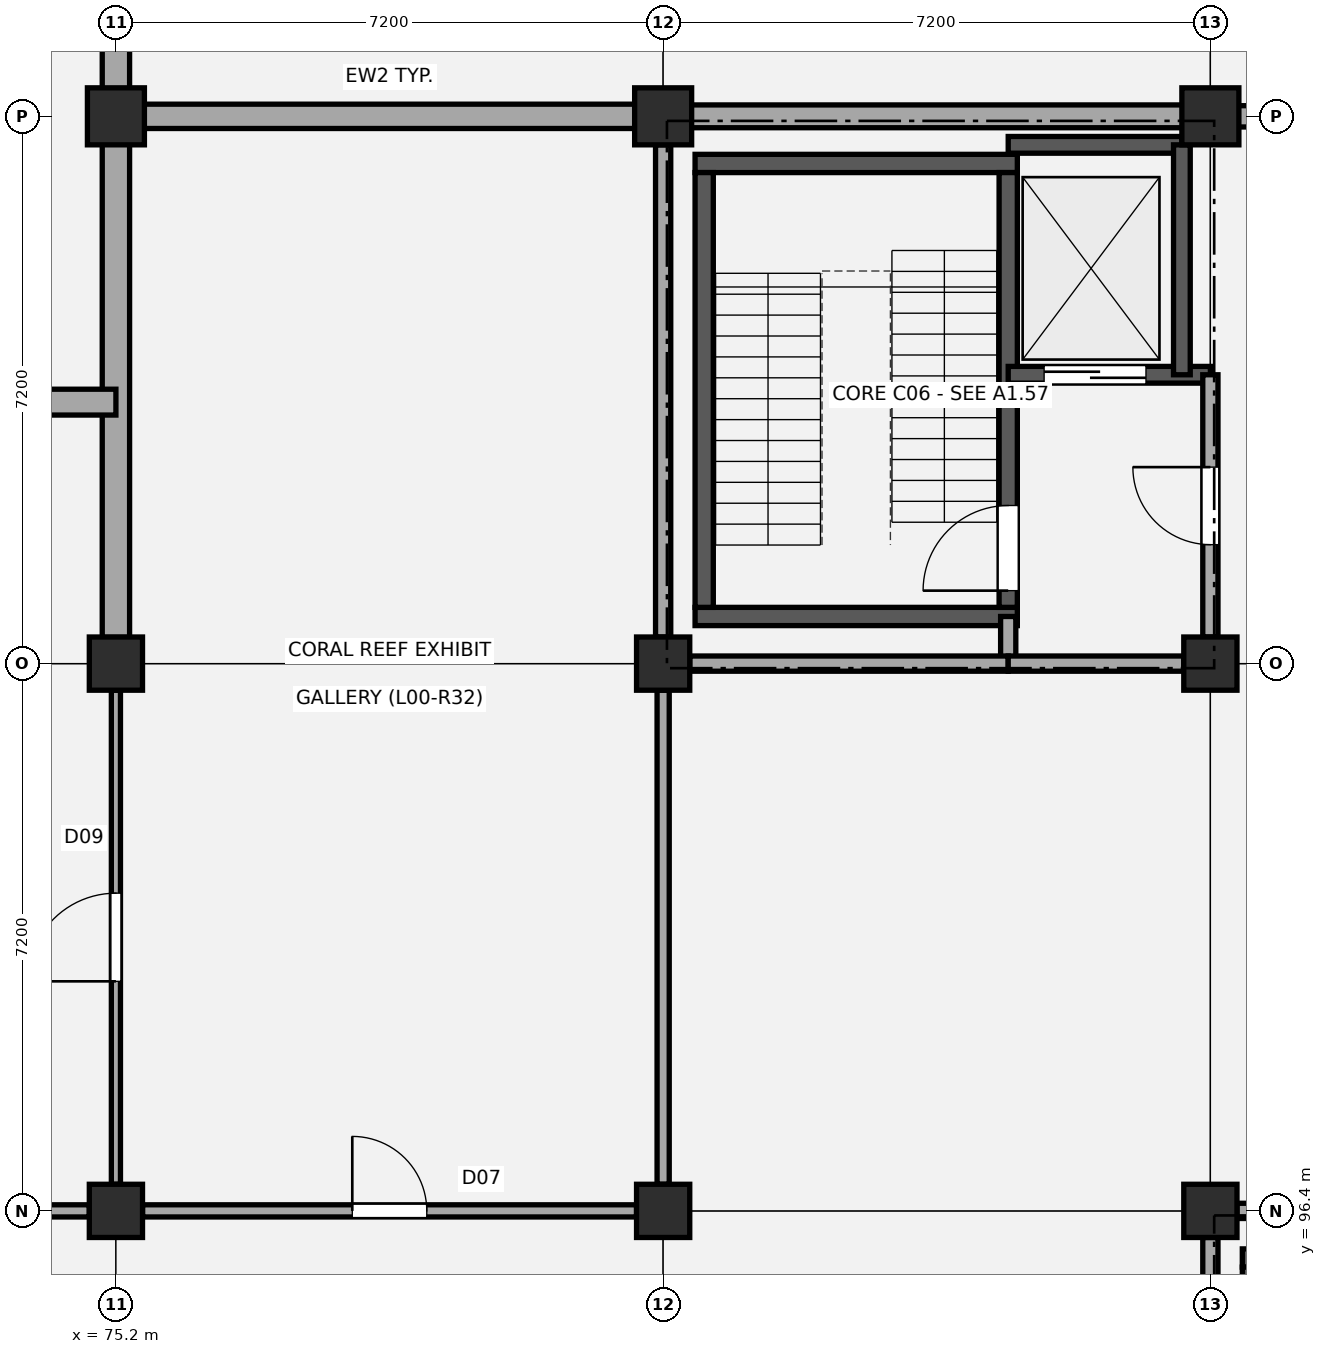
"""IFC4 building model, lengths in metres.
Left out: names, types, materials, properties, quantities, classifications, styles, units other than length and angle.
Written with IfcOpenShell. Run it as: python <this file> out.ifc"""

import sys

from ifc_helpers import new_model, si_unit, direction, frame, frame_2d, origin, origin_2d, place, context, subcontext, project, spatial, rectangle, circle, extrude, element, fill, save


model = new_model("IFC4")
c1 = context("Model", 3, precision=1e-05, world=origin(), true_north=direction((0.0, 1.0)))
c2 = subcontext(c1, "Body", "Model", "MODEL_VIEW")
j1 = project(units=[si_unit("LENGTHUNIT", "METRE"), si_unit("PLANEANGLEUNIT", "RADIAN")], contexts=[c1])
p1 = place(None, origin())
s1 = spatial("IfcSite", under=j1, at=p1, CompositionType="ELEMENT")
p2 = place(p1, origin())
s2 = spatial("IfcBuilding", under=s1, at=p2, CompositionType="ELEMENT")
p3 = place(p2, origin())
s3 = spatial("IfcBuildingStorey", under=s2, at=p3, CompositionType="ELEMENT", Elevation=0.0)
for number, where, z_axis, x_axis in (
    (1, (75.2, 96.4, -0.35), (0.0, 0.0, 1.0), (1.0, 0.0, 0.0)),
    (2, (75.2, 103.6, -0.35), (0.0, 0.0, 1.0), (1.0, 0.0, 0.0)),
):
    element("IfcColumn", number, at=place(p3, frame(where, z_axis=z_axis, x_axis=x_axis)), inside=s3, PredefinedType="COLUMN", context=c2, shape_type="SweptSolid", body=[
        extrude(rectangle(XDim=0.7, YDim=0.7, at=origin_2d()), origin(), (0.0, 0.0, 1.0), 5.03),
    ])
p4 = place(p3, frame((75.2, 110.8, -0.35), z_axis=(0.0, 0.0, 1.0), x_axis=(1.0, 0.0, 0.0)))
e3 = element("IfcColumn", 3, at=p4, inside=s3, PredefinedType="COLUMN", context=c2, shape_type="SweptSolid", body=[
    extrude(circle(Radius=0.375, at=origin_2d()), origin(), (0.0, 0.0, 1.0), 5.03),
])
for number, where, z_axis, x_axis in (
    (4, (82.4, 96.4, -0.35), (0.0, 0.0, 1.0), (1.0, 0.0, 0.0)),
    (5, (82.4, 103.6, -0.35), (0.0, 0.0, 1.0), (1.0, 0.0, 0.0)),
):
    element("IfcColumn", number, at=place(p3, frame(where, z_axis=z_axis, x_axis=x_axis)), inside=s3, PredefinedType="COLUMN", context=c2, shape_type="SweptSolid", body=[
        extrude(rectangle(XDim=0.7, YDim=0.7, at=origin_2d()), origin(), (0.0, 0.0, 1.0), 5.03),
    ])
p5 = place(p3, frame((82.4, 110.8, -0.35), z_axis=(0.0, 0.0, 1.0), x_axis=(1.0, 0.0, 0.0)))
e6 = element("IfcColumn", 6, at=p5, inside=s3, PredefinedType="COLUMN", context=c2, shape_type="SweptSolid", body=[
    extrude(circle(Radius=0.375, at=origin_2d()), origin(), (0.0, 0.0, 1.0), 5.03),
])
for number, where, z_axis, x_axis in (
    (7, (89.6, 96.4, -0.35), (0.0, 0.0, 1.0), (1.0, 0.0, 0.0)),
    (8, (89.6, 103.6, -0.35), (0.0, 0.0, 1.0), (1.0, 0.0, 0.0)),
):
    element("IfcColumn", number, at=place(p3, frame(where, z_axis=z_axis, x_axis=x_axis)), inside=s3, PredefinedType="COLUMN", context=c2, shape_type="SweptSolid", body=[
        extrude(rectangle(XDim=0.7, YDim=0.7, at=origin_2d()), origin(), (0.0, 0.0, 1.0), 5.03),
    ])
p6 = place(p3, frame((89.6, 110.8, -0.35), z_axis=(0.0, 0.0, 1.0), x_axis=(1.0, 0.0, 0.0)))
e9 = element("IfcColumn", 9, at=p6, inside=s3, PredefinedType="COLUMN", context=c2, shape_type="SweptSolid", body=[
    extrude(circle(Radius=0.375, at=origin_2d()), origin(), (0.0, 0.0, 1.0), 5.03),
])
p7 = place(p3, frame((75.51, 110.8, 0.0), z_axis=(0.0, 0.0, 1.0), x_axis=(1.0, 0.0, 0.0)))
e10 = element("IfcWall", 10, at=p7, inside=s3, PredefinedType="STANDARD", context=c2, shape_type="SweptSolid", body=[
    extrude(rectangle(XDim=6.58, YDim=0.32, at=frame_2d((3.29, 0.0))), origin(), (0.0, 0.0, 1.0), 3.67),
])
p8 = place(p3, frame((82.71, 110.8, 0.0), z_axis=(0.0, 0.0, 1.0), x_axis=(1.0, 0.0, 0.0)))
e11 = element("IfcWall", 11, at=p8, inside=s3, PredefinedType="STANDARD", context=c2, shape_type="SweptSolid", body=[
    extrude(rectangle(XDim=6.58, YDim=0.3, at=frame_2d((3.29, 0.0))), origin(), (0.0, 0.0, 1.0), 3.67),
])
p9 = place(p3, frame((89.91, 110.8, 0.0), z_axis=(0.0, 0.0, 1.0), x_axis=(1.0, 0.0, 0.0)))
e12 = element("IfcWall", 12, at=p9, inside=s3, PredefinedType="STANDARD", context=c2, shape_type="SweptSolid", body=[
    extrude(rectangle(XDim=6.58, YDim=0.28, at=frame_2d((3.29, 0.0))), origin(), (0.0, 0.0, 1.0), 3.67),
])
p10 = place(p9, frame((2.18, 0.0, 0.0)))
e13 = element("IfcOpeningElement", 13, at=p10, cuts=e12, PredefinedType="OPENING", context=c2, shape_type="SweptSolid", body=[
    extrude(rectangle(XDim=2.22, YDim=2.38, at=frame_2d((1.11, 1.19))), frame((0.0, 0.15, 0.0), z_axis=(0.0, -1.0, 0.0), x_axis=(1.0, 0.0, 0.0)), (0.0, 0.0, 1.0), 0.3),
])
p11 = place(p3, frame((75.2, 103.945, 0.0), z_axis=(0.0, 0.0, 1.0), x_axis=(0.0, 1.0, 0.0)))
e14 = element("IfcWall", 14, at=p11, inside=s3, PredefinedType="STANDARD", context=c2, shape_type="SweptSolid", body=[
    extrude(rectangle(XDim=8.095, YDim=0.36, at=frame_2d((4.047, 0.0))), origin(), (0.0, 0.0, 1.0), 3.62),
])
p12 = place(p3, frame((73.8, 107.04, 0.0), z_axis=(0.0, 0.0, 1.0), x_axis=(1.0, 0.0, 0.0)))
e15 = element("IfcWall", 15, at=p12, inside=s3, PredefinedType="STANDARD", context=c2, shape_type="SweptSolid", body=[
    extrude(rectangle(XDim=1.4, YDim=0.34, at=frame_2d((0.7, 0.0))), origin(), (0.0, 0.0, 1.0), 8.87),
])
for number, where, z_axis, x_axis in (
    (16, (82.82, 104.22, 0.0), (0.0, 0.0, 1.0), (1.0, 0.0, 0.0)),
    (17, (82.82, 110.18, 0.0), (0.0, 0.0, 1.0), (1.0, 0.0, 0.0)),
):
    element("IfcWall", number, at=place(p3, frame(where, z_axis=z_axis, x_axis=x_axis)), inside=s3, PredefinedType="SHEAR", context=c2, shape_type="SweptSolid", body=[
        extrude(rectangle(XDim=4.24, YDim=0.24, at=frame_2d((2.12, 0.0))), origin(), (0.0, 0.0, 1.0), 4.38),
    ])
p13 = place(p3, frame((82.94, 104.34, 0.0), z_axis=(0.0, 0.0, 1.0), x_axis=(0.0, 1.0, 0.0)))
e18 = element("IfcWall", 18, at=p13, inside=s3, PredefinedType="SHEAR", context=c2, shape_type="SweptSolid", body=[
    extrude(rectangle(XDim=5.72, YDim=0.24, at=frame_2d((2.86, 0.0))), origin(), (0.0, 0.0, 1.0), 4.38),
])
p14 = place(p3, frame((86.94, 104.34, 0.0), z_axis=(0.0, 0.0, 1.0), x_axis=(0.0, 1.0, 0.0)))
e19 = element("IfcWall", 19, at=p14, inside=s3, PredefinedType="SHEAR", context=c2, shape_type="SweptSolid", body=[
    extrude(rectangle(XDim=5.72, YDim=0.24, at=frame_2d((2.86, 0.0))), origin(), (0.0, 0.0, 1.0), 4.38),
])
p15 = place(p14, frame((0.22, 0.0, 0.0)))
e20 = element("IfcOpeningElement", 20, at=p15, cuts=e19, PredefinedType="OPENING", context=c2, shape_type="SweptSolid", body=[
    extrude(rectangle(XDim=1.12, YDim=2.15, at=frame_2d((0.56, 1.075))), frame((0.0, 0.13, 0.0), z_axis=(0.0, -1.0, 0.0), x_axis=(1.0, 0.0, 0.0)), (0.0, 0.0, 1.0), 0.26),
])
p16 = place(p3, frame((86.94, 107.4, 0.0), z_axis=(0.0, 0.0, 1.0), x_axis=(1.0, 0.0, 0.0)))
e21 = element("IfcWall", 21, at=p16, inside=s3, PredefinedType="SHEAR", context=c2, shape_type="SweptSolid", body=[
    extrude(rectangle(XDim=2.66, YDim=0.22, at=frame_2d((1.33, 0.0))), origin(), (0.0, 0.0, 1.0), 4.38),
])
p17 = place(p16, frame((0.472, 0.0, 0.0)))
e22 = element("IfcOpeningElement", 22, at=p17, cuts=e21, PredefinedType="OPENING", context=c2, shape_type="SweptSolid", body=[
    extrude(rectangle(XDim=1.34, YDim=2.15, at=frame_2d((0.67, 1.075))), frame((0.0, 0.12, 0.0), z_axis=(0.0, -1.0, 0.0), x_axis=(1.0, 0.0, 0.0)), (0.0, 0.0, 1.0), 0.24),
])
p18 = place(p3, frame((86.94, 110.425, 0.0), z_axis=(0.0, 0.0, 1.0), x_axis=(1.0, 0.0, 0.0)))
e23 = element("IfcWall", 23, at=p18, inside=s3, PredefinedType="SHEAR", context=c2, shape_type="SweptSolid", body=[
    extrude(rectangle(XDim=2.285, YDim=0.22, at=frame_2d((1.143, 0.0))), origin(), (0.0, 0.0, 1.0), 4.38),
])
p19 = place(p3, frame((89.225, 107.4, 0.0), z_axis=(0.0, 0.0, 1.0), x_axis=(0.0, 1.0, 0.0)))
e24 = element("IfcWall", 24, at=p19, inside=s3, PredefinedType="SHEAR", context=c2, shape_type="SweptSolid", body=[
    extrude(rectangle(XDim=3.025, YDim=0.22, at=frame_2d((1.513, 0.0))), origin(), (0.0, 0.0, 1.0), 4.38),
])
p20 = place(p3, frame((86.94, 103.6, 0.0), z_axis=(0.0, 0.0, 1.0), x_axis=(0.0, 1.0, 0.0)))
e25 = element("IfcWall", 25, at=p20, inside=s3, PredefinedType="PARTITIONING", context=c2, shape_type="SweptSolid", body=[
    extrude(rectangle(XDim=0.62, YDim=0.2, at=frame_2d((0.31, 0.0))), origin(), (0.0, 0.0, 1.0), 3.62),
])
p21 = place(p3, frame((82.4, 103.95, 0.0), z_axis=(0.0, 0.0, 1.0), x_axis=(0.0, 1.0, 0.0)))
e26 = element("IfcWall", 26, at=p21, inside=s3, PredefinedType="PARTITIONING", context=c2, shape_type="SweptSolid", body=[
    extrude(rectangle(XDim=6.475, YDim=0.2, at=frame_2d((3.238, 0.0))), origin(), (0.0, 0.0, 1.0), 3.62),
])
p22 = place(p3, frame((89.6, 103.95, 0.0), z_axis=(0.0, 0.0, 1.0), x_axis=(0.0, 1.0, 0.0)))
e27 = element("IfcWall", 27, at=p22, inside=s3, PredefinedType="PARTITIONING", context=c2, shape_type="SweptSolid", body=[
    extrude(rectangle(XDim=3.45, YDim=0.2, at=frame_2d((1.725, 0.0))), origin(), (0.0, 0.0, 1.0), 3.62),
])
p23 = place(p22, frame((1.215, 0.0, 0.0)))
e28 = element("IfcOpeningElement", 28, at=p23, cuts=e27, PredefinedType="OPENING", context=c2, shape_type="SweptSolid", body=[
    extrude(rectangle(XDim=1.02, YDim=2.15, at=frame_2d((0.51, 1.075))), frame((0.0, 0.11, 0.0), z_axis=(0.0, -1.0, 0.0), x_axis=(1.0, 0.0, 0.0)), (0.0, 0.0, 1.0), 0.22),
])
p24 = place(p3, frame((82.75, 103.6, 0.0), z_axis=(0.0, 0.0, 1.0), x_axis=(1.0, 0.0, 0.0)))
e29 = element("IfcWall", 29, at=p24, inside=s3, PredefinedType="PARTITIONING", context=c2, shape_type="SweptSolid", body=[
    extrude(rectangle(XDim=4.19, YDim=0.2, at=frame_2d((2.095, 0.0))), origin(), (0.0, 0.0, 1.0), 3.62),
])
p25 = place(p3, frame((86.94, 103.6, 0.0), z_axis=(0.0, 0.0, 1.0), x_axis=(1.0, 0.0, 0.0)))
e30 = element("IfcWall", 30, at=p25, inside=s3, PredefinedType="PARTITIONING", context=c2, shape_type="SweptSolid", body=[
    extrude(rectangle(XDim=2.31, YDim=0.2, at=frame_2d((1.155, 0.0))), origin(), (0.0, 0.0, 1.0), 3.62),
])
p26 = place(p3, frame((90.02, 95.78, 0.0), z_axis=(0.0, 0.0, 1.0), x_axis=(1.0, 0.0, 0.0)))
e31 = element("IfcWall", 31, at=p26, inside=s3, PredefinedType="SHEAR", context=c2, shape_type="SweptSolid", body=[
    extrude(rectangle(XDim=4.24, YDim=0.24, at=frame_2d((2.12, 0.0))), origin(), (0.0, 0.0, 1.0), 4.38),
])
p27 = place(p3, frame((90.14, 89.94, 0.0), z_axis=(0.0, 0.0, 1.0), x_axis=(0.0, 1.0, 0.0)))
e32 = element("IfcWall", 32, at=p27, inside=s3, PredefinedType="SHEAR", context=c2, shape_type="SweptSolid", body=[
    extrude(rectangle(XDim=5.72, YDim=0.24, at=frame_2d((2.86, 0.0))), origin(), (0.0, 0.0, 1.0), 4.38),
])
for number, where, z_axis, x_axis in (
    (33, (89.6, 89.55, 0.0), (0.0, 0.0, 1.0), (0.0, 1.0, 0.0)),
    (34, (89.95, 96.4, 0.0), (0.0, 0.0, 1.0), (1.0, 0.0, 0.0)),
):
    element("IfcWall", number, at=place(p3, frame(where, z_axis=z_axis, x_axis=x_axis)), inside=s3, PredefinedType="PARTITIONING", context=c2, shape_type="SweptSolid", body=[
        extrude(rectangle(XDim=6.5, YDim=0.2, at=frame_2d((3.25, 0.0))), origin(), (0.0, 0.0, 1.0), 3.62),
    ])
p28 = place(p3, frame((68.35, 96.4, 0.0), z_axis=(0.0, 0.0, 1.0), x_axis=(1.0, 0.0, 0.0)))
e35 = element("IfcWall", 35, at=p28, inside=s3, PredefinedType="PARTITIONING", context=c2, shape_type="SweptSolid", body=[
    extrude(rectangle(XDim=6.5, YDim=0.16, at=frame_2d((3.25, 0.0))), origin(), (0.0, 0.0, 1.0), 3.52),
])
p29 = place(p3, frame((75.2, 96.75, 0.0), z_axis=(0.0, 0.0, 1.0), x_axis=(0.0, 1.0, 0.0)))
e36 = element("IfcWall", 36, at=p29, inside=s3, PredefinedType="PARTITIONING", context=c2, shape_type="SweptSolid", body=[
    extrude(rectangle(XDim=6.5, YDim=0.12, at=frame_2d((3.25, 0.0))), origin(), (0.0, 0.0, 1.0), 3.62),
])
p30 = place(p29, frame((2.67, 0.0, 0.0)))
e37 = element("IfcOpeningElement", 37, at=p30, cuts=e36, PredefinedType="OPENING", context=c2, shape_type="SweptSolid", body=[
    extrude(rectangle(XDim=1.16, YDim=2.18, at=frame_2d((0.58, 1.09))), frame((0.0, 0.07, 0.0), z_axis=(0.0, -1.0, 0.0), x_axis=(1.0, 0.0, 0.0)), (0.0, 0.0, 1.0), 0.14),
])
p31 = place(p3, frame((75.55, 96.4, 0.0), z_axis=(0.0, 0.0, 1.0), x_axis=(1.0, 0.0, 0.0)))
e38 = element("IfcWall", 38, at=p31, inside=s3, PredefinedType="PARTITIONING", context=c2, shape_type="SweptSolid", body=[
    extrude(rectangle(XDim=6.5, YDim=0.16, at=frame_2d((3.25, 0.0))), origin(), (0.0, 0.0, 1.0), 3.62),
])
p32 = place(p31, frame((2.76, 0.0, 0.0)))
e39 = element("IfcOpeningElement", 39, at=p32, cuts=e38, PredefinedType="OPENING", context=c2, shape_type="SweptSolid", body=[
    extrude(rectangle(XDim=0.98, YDim=2.12, at=frame_2d((0.49, 1.06))), frame((0.0, 0.09, 0.0), z_axis=(0.0, -1.0, 0.0), x_axis=(1.0, 0.0, 0.0)), (0.0, 0.0, 1.0), 0.18),
])
p33 = place(p3, frame((82.4, 96.75, 0.0), z_axis=(0.0, 0.0, 1.0), x_axis=(0.0, 1.0, 0.0)))
e40 = element("IfcWall", 40, at=p33, inside=s3, PredefinedType="PARTITIONING", context=c2, shape_type="SweptSolid", body=[
    extrude(rectangle(XDim=6.5, YDim=0.16, at=frame_2d((3.25, 0.0))), origin(), (0.0, 0.0, 1.0), 3.62),
])
p34 = place(p15, origin())
e41 = element("IfcDoor", 41, at=p34, inside=s3, OperationType="SINGLE_SWING_LEFT", PredefinedType="DOOR", context=c2, shape_type="SweptSolid", body=[
    extrude(rectangle(XDim=1.12, YDim=2.15, at=frame_2d((0.56, 1.075))), frame((0.0, 0.025, 0.0), z_axis=(0.0, -1.0, 0.0), x_axis=(1.0, 0.0, 0.0)), (0.0, 0.0, 1.0), 0.05),
])
fill(e20, e41)
p35 = place(p17, origin())
e42 = element("IfcDoor", 42, at=p35, inside=s3, OperationType="DOUBLE_DOOR_SLIDING", PredefinedType="DOOR", context=c2, shape_type="SweptSolid", body=[
    extrude(rectangle(XDim=1.34, YDim=2.15, at=frame_2d((0.67, 1.075))), frame((0.0, 0.025, 0.0), z_axis=(0.0, -1.0, 0.0), x_axis=(1.0, 0.0, 0.0)), (0.0, 0.0, 1.0), 0.05),
])
fill(e22, e42)
p36 = place(p23, origin())
e43 = element("IfcDoor", 43, at=p36, inside=s3, OperationType="SINGLE_SWING_RIGHT", PredefinedType="DOOR", context=c2, shape_type="SweptSolid", body=[
    extrude(rectangle(XDim=1.02, YDim=2.15, at=frame_2d((0.51, 1.075))), frame((0.0, 0.025, 0.0), z_axis=(0.0, -1.0, 0.0), x_axis=(1.0, 0.0, 0.0)), (0.0, 0.0, 1.0), 0.05),
])
fill(e28, e43)
p37 = place(p32, origin())
e44 = element("IfcDoor", 44, at=p37, inside=s3, OperationType="SINGLE_SWING_LEFT", PredefinedType="DOOR", context=c2, shape_type="SweptSolid", body=[
    extrude(rectangle(XDim=0.98, YDim=2.12, at=frame_2d((0.49, 1.06))), frame((0.0, 0.025, 0.0), z_axis=(0.0, -1.0, 0.0), x_axis=(1.0, 0.0, 0.0)), (0.0, 0.0, 1.0), 0.05),
])
fill(e39, e44)
p38 = place(p30, origin())
e45 = element("IfcDoor", 45, at=p38, inside=s3, OperationType="SINGLE_SWING_LEFT", PredefinedType="DOOR", context=c2, shape_type="SweptSolid", body=[
    extrude(rectangle(XDim=1.16, YDim=2.18, at=frame_2d((0.58, 1.09))), frame((0.0, 0.025, 0.0), z_axis=(0.0, -1.0, 0.0), x_axis=(1.0, 0.0, 0.0)), (0.0, 0.0, 1.0), 0.05),
])
fill(e37, e45)
save(model, sys.argv[1])
